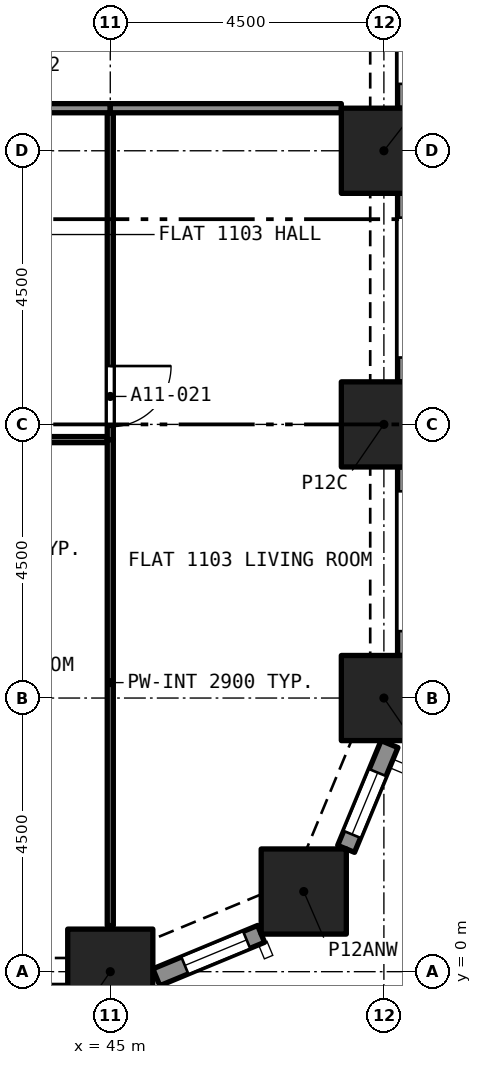
"""IFC4 building model, lengths in metres.
Left out: names, types, materials, properties, quantities, classifications, styles, units other than length and angle.
Written with IfcOpenShell. Run it as: python <this file> out.ifc"""

import sys

from ifc_helpers import new_model, si_unit, direction, frame, frame_2d, origin, origin_2d, place, context, subcontext, project, spatial, rectangle, extrude, element, fill, save


model = new_model("IFC4")
c1 = context("Model", 3, precision=1e-05, world=origin(), true_north=direction((0.0, 1.0)))
c2 = subcontext(c1, "Body", "Model", "MODEL_VIEW")
j1 = project(units=[si_unit("LENGTHUNIT", "METRE"), si_unit("PLANEANGLEUNIT", "RADIAN")], contexts=[c1])
p1 = place(None, origin())
s1 = spatial("IfcSite", under=j1, at=p1, CompositionType="ELEMENT")
p2 = place(p1, origin())
s2 = spatial("IfcBuilding", under=s1, at=p2, CompositionType="ELEMENT")
p3 = place(p2, frame((0.0, 0.0, 46.4)))
s3 = spatial("IfcBuildingStorey", under=s2, at=p3, CompositionType="ELEMENT", Elevation=46.4)
for number, where, z_axis, x_axis in (
    (1, (45.0, 0.0, 0.0), (0.0, 0.0, 1.0), (1.0, 0.0, 0.0)),
    (2, (48.182, 1.318, 0.0), (0.0, 0.0, 1.0), (1.0, 0.0, 0.0)),
    (3, (49.5, 4.5, 0.0), (0.0, 0.0, 1.0), (1.0, 0.0, 0.0)),
    (4, (49.5, 9.0, 0.0), (0.0, 0.0, 1.0), (1.0, 0.0, 0.0)),
    (5, (49.5, 13.5, 0.0), (0.0, 0.0, 1.0), (1.0, 0.0, 0.0)),
):
    element("IfcColumn", number, at=place(p3, frame(where, z_axis=z_axis, x_axis=x_axis)), inside=s3, PredefinedType="COLUMN", context=c2, shape_type="SweptSolid", body=[
        extrude(rectangle(XDim=1.4, YDim=1.4, at=origin_2d()), origin(), (0.0, 0.0, 1.0), 3.2),
    ])
p4 = place(p3, frame((47.48, 0.622, 0.0), z_axis=(0.0, 0.0, 1.0), x_axis=(-0.923903565336, -0.38262540684, 0.0)))
e6 = element("IfcWall", 6, at=p4, inside=s3, PredefinedType="SOLIDWALL", context=c2, shape_type="SweptSolid", body=[
    extrude(rectangle(XDim=1.865, YDim=0.3, at=frame_2d((0.933, 0.0))), origin(), (0.0, 0.0, 1.0), 3.2),
])
p5 = place(p4, frame((0.258, 0.0, 0.45)))
e7 = element("IfcOpeningElement", 7, at=p5, cuts=e6, PredefinedType="OPENING", context=c2, shape_type="SweptSolid", body=[
    extrude(rectangle(XDim=1.1, YDim=1.95, at=frame_2d((0.55, 0.975))), frame((0.0, 0.16, 0.0), z_axis=(0.0, -1.0, 0.0), x_axis=(1.0, 0.0, 0.0)), (0.0, 0.0, 1.0), 0.32),
])
p6 = place(p3, frame((49.592, 3.743, 0.0), z_axis=(0.0, 0.0, 1.0), x_axis=(-0.382737135771, -0.923857286003, 0.0)))
e8 = element("IfcWall", 8, at=p6, inside=s3, PredefinedType="SOLIDWALL", context=c2, shape_type="SweptSolid", body=[
    extrude(rectangle(XDim=1.865, YDim=0.3, at=frame_2d((0.933, 0.0))), origin(), (0.0, 0.0, 1.0), 3.2),
])
p7 = place(p6, frame((0.508, 0.0, 0.45)))
e9 = element("IfcOpeningElement", 9, at=p7, cuts=e8, PredefinedType="OPENING", context=c2, shape_type="SweptSolid", body=[
    extrude(rectangle(XDim=1.1, YDim=1.95, at=frame_2d((0.55, 0.975))), frame((0.0, 0.16, 0.0), z_axis=(0.0, -1.0, 0.0), x_axis=(1.0, 0.0, 0.0)), (0.0, 0.0, 1.0), 0.32),
])
p8 = place(p3, frame((49.875, 8.3, 0.0), z_axis=(0.0, 0.0, 1.0), x_axis=(0.0, -1.0, 0.0)))
e10 = element("IfcWall", 10, at=p8, inside=s3, PredefinedType="SOLIDWALL", context=c2, shape_type="SweptSolid", body=[
    extrude(rectangle(XDim=3.1, YDim=0.3, at=frame_2d((1.55, 0.0))), origin(), (0.0, 0.0, 1.0), 3.2),
])
p9 = place(p8, frame((0.4, 0.0, 0.45)))
e11 = element("IfcOpeningElement", 11, at=p9, cuts=e10, PredefinedType="OPENING", context=c2, shape_type="SweptSolid", body=[
    extrude(rectangle(XDim=2.3, YDim=1.95, at=frame_2d((1.15, 0.975))), frame((0.0, 0.16, 0.0), z_axis=(0.0, -1.0, 0.0), x_axis=(1.0, 0.0, 0.0)), (0.0, 0.0, 1.0), 0.32),
])
p10 = place(p3, frame((49.875, 12.8, 0.0), z_axis=(0.0, 0.0, 1.0), x_axis=(0.0, -1.0, 0.0)))
e12 = element("IfcWall", 12, at=p10, inside=s3, PredefinedType="SOLIDWALL", context=c2, shape_type="SweptSolid", body=[
    extrude(rectangle(XDim=3.1, YDim=0.3, at=frame_2d((1.55, 0.0))), origin(), (0.0, 0.0, 1.0), 3.2),
])
p11 = place(p10, frame((0.4, 0.0, 0.45)))
e13 = element("IfcOpeningElement", 13, at=p11, cuts=e12, PredefinedType="OPENING", context=c2, shape_type="SweptSolid", body=[
    extrude(rectangle(XDim=2.3, YDim=1.95, at=frame_2d((1.15, 0.975))), frame((0.0, 0.16, 0.0), z_axis=(0.0, -1.0, 0.0), x_axis=(1.0, 0.0, 0.0)), (0.0, 0.0, 1.0), 0.32),
])
p12 = place(p3, frame((49.875, 17.3, 0.0), z_axis=(0.0, 0.0, 1.0), x_axis=(0.0, -1.0, 0.0)))
e14 = element("IfcWall", 14, at=p12, inside=s3, PredefinedType="SOLIDWALL", context=c2, shape_type="SweptSolid", body=[
    extrude(rectangle(XDim=3.1, YDim=0.3, at=frame_2d((1.55, 0.0))), origin(), (0.0, 0.0, 1.0), 3.2),
])
p13 = place(p12, frame((0.4, 0.0, 0.45)))
e15 = element("IfcOpeningElement", 15, at=p13, cuts=e14, PredefinedType="OPENING", context=c2, shape_type="SweptSolid", body=[
    extrude(rectangle(XDim=2.3, YDim=1.95, at=frame_2d((1.15, 0.975))), frame((0.0, 0.16, 0.0), z_axis=(0.0, -1.0, 0.0), x_axis=(1.0, 0.0, 0.0)), (0.0, 0.0, 1.0), 0.32),
])
p14 = place(p3, frame((44.95, 8.75, 0.0), z_axis=(0.0, 0.0, 1.0), x_axis=(-1.0, 0.0, 0.0)))
e16 = element("IfcWall", 16, at=p14, inside=s3, PredefinedType="PARTITIONING", context=c2, shape_type="SweptSolid", body=[
    extrude(rectangle(XDim=4.35, YDim=0.1, at=frame_2d((2.175, 0.0))), origin(), (0.0, 0.0, 1.0), 2.9),
])
p15 = place(p14, frame((1.75, 0.0, 0.0)))
e17 = element("IfcOpeningElement", 17, at=p15, cuts=e16, PredefinedType="OPENING", context=c2, shape_type="SweptSolid", body=[
    extrude(rectangle(XDim=0.9, YDim=2.1, at=frame_2d((0.45, 1.05))), frame((0.0, 0.06, 0.0), z_axis=(0.0, -1.0, 0.0), x_axis=(1.0, 0.0, 0.0)), (0.0, 0.0, 1.0), 0.12),
])
p16 = place(p3, frame((45.0, 0.758, 0.0), z_axis=(0.0, 0.0, 1.0), x_axis=(0.0, 1.0, 0.0)))
e18 = element("IfcWall", 18, at=p16, inside=s3, PredefinedType="PARTITIONING", context=c2, shape_type="SweptSolid", body=[
    extrude(rectangle(XDim=7.992, YDim=0.1, at=frame_2d((3.996, 0.0))), origin(), (0.0, 0.0, 1.0), 2.9),
])
p17 = place(p3, frame((45.0, 14.125, 0.0), z_axis=(0.0, 0.0, 1.0), x_axis=(0.0, -1.0, 0.0)))
e19 = element("IfcWall", 19, at=p17, inside=s3, PredefinedType="PARTITIONING", context=c2, shape_type="SweptSolid", body=[
    extrude(rectangle(XDim=5.375, YDim=0.1, at=frame_2d((2.688, 0.0))), origin(), (0.0, 0.0, 1.0), 2.9),
])
p18 = place(p17, frame((4.165, 0.0, 0.0)))
e20 = element("IfcOpeningElement", 20, at=p18, cuts=e19, PredefinedType="OPENING", context=c2, shape_type="SweptSolid", body=[
    extrude(rectangle(XDim=1.0, YDim=2.1, at=frame_2d((0.5, 1.05))), frame((0.0, 0.06, 0.0), z_axis=(0.0, -1.0, 0.0), x_axis=(1.0, 0.0, 0.0)), (0.0, 0.0, 1.0), 0.12),
])
p19 = place(p3, frame((45.0, 14.2, 0.0), z_axis=(0.0, 0.0, 1.0), x_axis=(-1.0, 0.0, 0.0)))
e21 = element("IfcWall", 21, at=p19, inside=s3, PredefinedType="PARTITIONING", context=c2, shape_type="SweptSolid", body=[
    extrude(rectangle(XDim=2.25, YDim=0.15, at=frame_2d((1.125, 0.0))), origin(), (0.0, 0.0, 1.0), 2.9),
])
p20 = place(p19, frame((1.0, 0.0, 0.0)))
e22 = element("IfcOpeningElement", 22, at=p20, cuts=e21, PredefinedType="OPENING", context=c2, shape_type="SweptSolid", body=[
    extrude(rectangle(XDim=1.0, YDim=2.1, at=frame_2d((0.5, 1.05))), frame((0.0, 0.085, 0.0), z_axis=(0.0, -1.0, 0.0), x_axis=(1.0, 0.0, 0.0)), (0.0, 0.0, 1.0), 0.17),
])
p21 = place(p3, frame((45.0, 14.2, 0.0), z_axis=(0.0, 0.0, 1.0), x_axis=(1.0, 0.0, 0.0)))
e23 = element("IfcWall", 23, at=p21, inside=s3, PredefinedType="PARTITIONING", context=c2, shape_type="SweptSolid", body=[
    extrude(rectangle(XDim=3.8, YDim=0.15, at=frame_2d((1.9, 0.0))), origin(), (0.0, 0.0, 1.0), 2.9),
])
p22 = place(p5, origin())
e24 = element("IfcWindow", 24, at=p22, inside=s3, PartitioningType="SINGLE_PANEL", PredefinedType="WINDOW", context=c2, shape_type="SweptSolid", body=[
    extrude(rectangle(XDim=1.1, YDim=1.95, at=frame_2d((0.55, 0.975))), frame((0.0, 0.03, 0.0), z_axis=(0.0, -1.0, 0.0), x_axis=(1.0, 0.0, 0.0)), (0.0, 0.0, 1.0), 0.06),
])
fill(e7, e24)
p23 = place(p7, origin())
e25 = element("IfcWindow", 25, at=p23, inside=s3, PartitioningType="SINGLE_PANEL", PredefinedType="WINDOW", context=c2, shape_type="SweptSolid", body=[
    extrude(rectangle(XDim=1.1, YDim=1.95, at=frame_2d((0.55, 0.975))), frame((0.0, 0.03, 0.0), z_axis=(0.0, -1.0, 0.0), x_axis=(1.0, 0.0, 0.0)), (0.0, 0.0, 1.0), 0.06),
])
fill(e9, e25)
p24 = place(p18, origin())
e26 = element("IfcDoor", 26, at=p24, inside=s3, OperationType="SINGLE_SWING_RIGHT", PredefinedType="DOOR", context=c2, shape_type="SweptSolid", body=[
    extrude(rectangle(XDim=1.0, YDim=2.1, at=frame_2d((0.5, 1.05))), frame((0.0, 0.025, 0.0), z_axis=(0.0, -1.0, 0.0), x_axis=(1.0, 0.0, 0.0)), (0.0, 0.0, 1.0), 0.05),
])
fill(e20, e26)
save(model, sys.argv[1])
